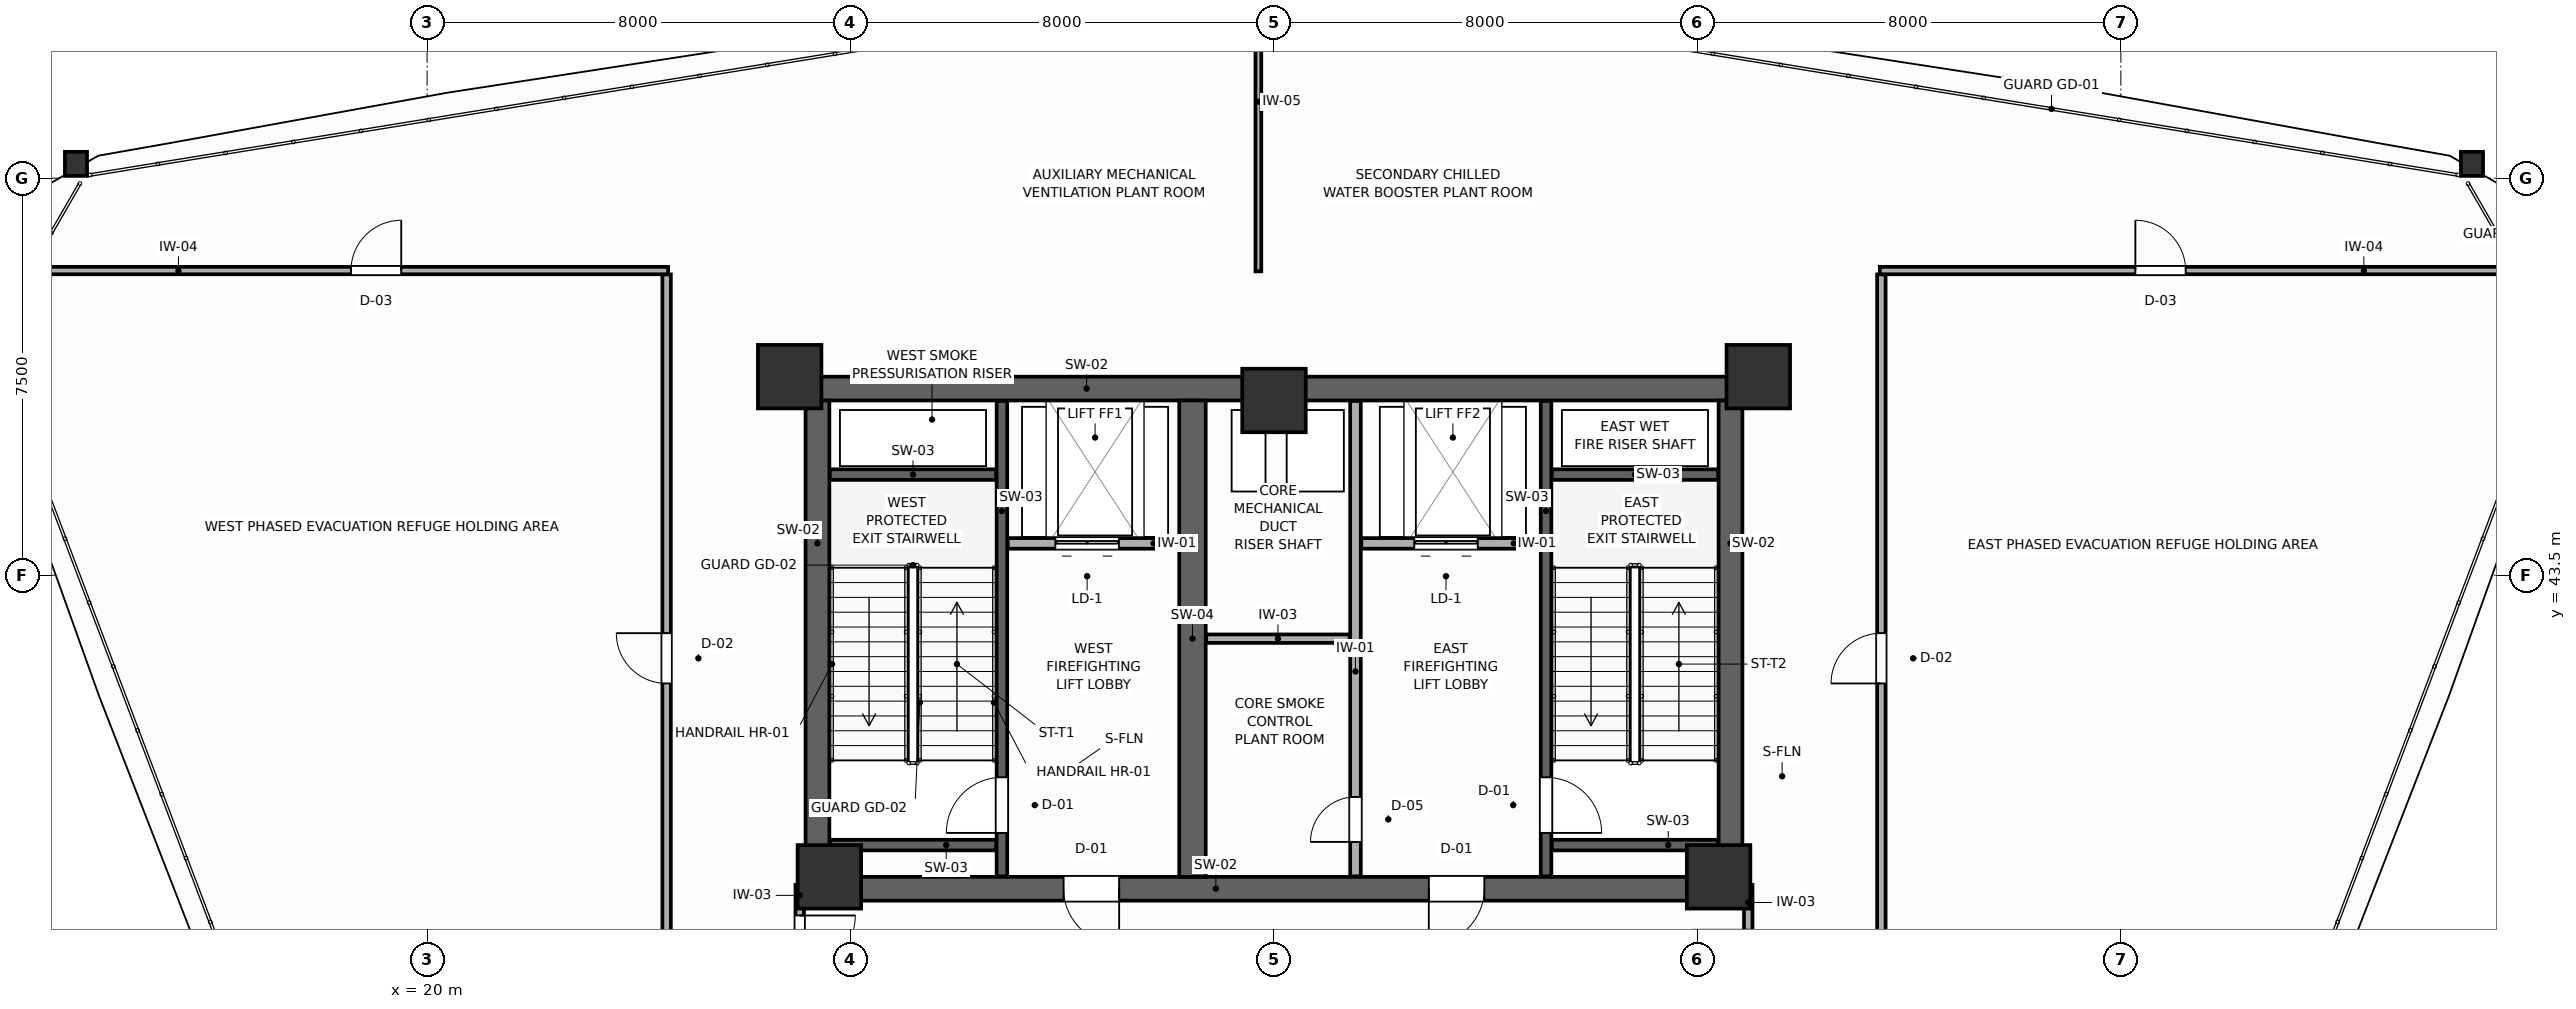
"""IFC4 building model, lengths in metres.
Left out: names, types, materials, properties, quantities, classifications, styles, units other than length and angle.
Written with IfcOpenShell. Run it as: python <this file> out.ifc"""

import sys

from ifc_helpers import new_model, si_unit, direction, frame, frame_2d, origin, origin_2d, place, context, subcontext, project, spatial, rectangle, i_section, extrude, source, transform, mapped, element, fill, save


model = new_model("IFC4")
c1 = context("Model", 3, precision=1e-05, world=origin(), true_north=direction((0.0, 1.0)))
c2 = subcontext(c1, "Body", "Model", "MODEL_VIEW")
j1 = project(units=[si_unit("LENGTHUNIT", "METRE"), si_unit("PLANEANGLEUNIT", "RADIAN")], contexts=[c1])
p1 = place(None, origin())
s1 = spatial("IfcSite", under=j1, at=p1, CompositionType="ELEMENT")
p2 = place(p1, origin())
s2 = spatial("IfcBuilding", under=s1, at=p2, CompositionType="ELEMENT")
p3 = place(p2, frame((0.0, 0.0, 131.4)))
s3 = spatial("IfcBuildingStorey", under=s2, at=p3, CompositionType="ELEMENT", Elevation=131.4)
p4 = place(p3, frame((27.15, 47.025, 0.0), z_axis=(0.0, 0.0, 1.0), x_axis=(1.0, 0.0, 0.0)))
e1 = element("IfcWall", 1, at=p4, inside=s3, PredefinedType="SHEAR", context=c2, shape_type="SweptSolid", body=[
    extrude(rectangle(XDim=17.7, YDim=0.45, at=frame_2d((8.85, 0.0))), origin(), (0.0, 0.0, 1.0), 4.8),
])
p5 = place(p3, frame((27.15, 37.575, 0.0), z_axis=(0.0, 0.0, 1.0), x_axis=(1.0, 0.0, 0.0)))
e2 = element("IfcWall", 2, at=p5, inside=s3, PredefinedType="SHEAR", context=c2, shape_type="SweptSolid", body=[
    extrude(rectangle(XDim=17.7, YDim=0.45, at=frame_2d((8.85, 0.0))), origin(), (0.0, 0.0, 1.0), 4.8),
])
p6 = place(p5, frame((4.875, 0.0, 0.0)))
e3 = element("IfcOpeningElement", 3, at=p6, cuts=e2, PredefinedType="OPENING", context=c2, shape_type="SweptSolid", body=[
    extrude(rectangle(XDim=1.05, YDim=2.1, at=frame_2d((0.525, 1.05))), frame((0.0, 0.235, 0.0), z_axis=(0.0, -1.0, 0.0), x_axis=(1.0, 0.0, 0.0)), (0.0, 0.0, 1.0), 0.47),
])
p7 = place(p5, frame((11.775, 0.0, 0.0)))
e4 = element("IfcOpeningElement", 4, at=p7, cuts=e2, PredefinedType="OPENING", context=c2, shape_type="SweptSolid", body=[
    extrude(rectangle(XDim=1.05, YDim=2.1, at=frame_2d((0.525, 1.05))), frame((0.0, 0.235, 0.0), z_axis=(0.0, -1.0, 0.0), x_axis=(1.0, 0.0, 0.0)), (0.0, 0.0, 1.0), 0.47),
])
for number, where, z_axis, x_axis in (
    (5, (27.375, 37.8, 0.0), (0.0, 0.0, 1.0), (0.0, 1.0, 0.0)),
    (6, (44.625, 37.8, 0.0), (0.0, 0.0, 1.0), (0.0, 1.0, 0.0)),
):
    element("IfcWall", number, at=place(p3, frame(where, z_axis=z_axis, x_axis=x_axis)), inside=s3, PredefinedType="SHEAR", context=c2, shape_type="SweptSolid", body=[
        extrude(rectangle(XDim=9.0, YDim=0.45, at=frame_2d((4.5, 0.0))), origin(), (0.0, 0.0, 1.0), 4.8),
    ])
p8 = place(p3, frame((34.46, 37.8, 0.0), z_axis=(0.0, 0.0, 1.0), x_axis=(0.0, 1.0, 0.0)))
e7 = element("IfcWall", 7, at=p8, inside=s3, PredefinedType="SHEAR", context=c2, shape_type="SweptSolid", body=[
    extrude(rectangle(XDim=9.0, YDim=0.5, at=frame_2d((4.5, 0.0))), origin(), (0.0, 0.0, 1.0), 4.6),
])
m1 = source(origin(), c2, "Body", "SweptSolid", [
    extrude(rectangle(XDim=1.2, YDim=1.2, at=origin_2d()), origin(), (0.0, 0.0, 1.0), 4.8),
])
for number, where, z_axis, x_axis in (
    (8, (26.85, 47.25, 0.0), (0.0, 0.0, 1.0), (1.0, 0.0, 0.0)),
    (9, (45.15, 47.25, 0.0), (0.0, 0.0, 1.0), (1.0, 0.0, 0.0)),
    (10, (27.6, 37.8, 0.0), (0.0, 0.0, 1.0), (1.0, 0.0, 0.0)),
    (11, (44.4, 37.8, 0.0), (0.0, 0.0, 1.0), (1.0, 0.0, 0.0)),
    (12, (36.0, 46.8, 0.0), (0.0, 0.0, 1.0), (1.0, 0.0, 0.0)),
):
    element("IfcColumn", number, at=place(p3, frame(where, z_axis=z_axis, x_axis=x_axis)), inside=s3, PredefinedType="COLUMN", context=c2, shape_type="MappedRepresentation", body=[
        mapped(m1, transform((0.0, 0.0, 0.0), scale=1.0)),
    ])
m2 = source(origin(), c2, "Body", "SweptSolid", [
    extrude(i_section(OverallWidth=0.418, OverallDepth=0.455, WebThickness=0.039, FlangeThickness=0.063, FilletRadius=0.015, at=origin_2d()), origin(), (0.0, 0.0, 1.0), 4.8),
])
for number, where, z_axis, x_axis in (
    (13, (58.634, 51.271, 0.0), (0.0, 0.0, 1.0), (1.0, 0.0, 0.0)),
    (14, (13.366, 51.271, 0.0), (0.0, 0.0, 1.0), (1.0, 0.0, 0.0)),
):
    element("IfcColumn", number, at=place(p3, frame(where, z_axis=z_axis, x_axis=x_axis)), inside=s3, PredefinedType="COLUMN", context=c2, shape_type="MappedRepresentation", body=[
        mapped(m2, transform((0.0, 0.0, 0.0), scale=1.0)),
    ])
p9 = place(p3, frame((30.86, 37.81, 0.0), z_axis=(0.0, 0.0, 1.0), x_axis=(0.0, 1.0, 0.0)))
e15 = element("IfcWall", 15, at=p9, inside=s3, PredefinedType="SHEAR", context=c2, shape_type="SweptSolid", body=[
    extrude(rectangle(XDim=8.98, YDim=0.2, at=frame_2d((4.49, 0.0))), origin(), (0.0, 0.0, 1.0), 4.8),
])
p10 = place(p9, frame((0.82, 0.0, 0.0)))
e16 = element("IfcOpeningElement", 16, at=p10, cuts=e15, PredefinedType="OPENING", context=c2, shape_type="SweptSolid", body=[
    extrude(rectangle(XDim=1.05, YDim=2.1, at=frame_2d((0.525, 1.05))), frame((0.0, 0.11, 0.0), z_axis=(0.0, -1.0, 0.0), x_axis=(1.0, 0.0, 0.0)), (0.0, 0.0, 1.0), 0.22),
])
for number, where, z_axis, x_axis in (
    (17, (27.61, 45.4, 0.0), (0.0, 0.0, 1.0), (1.0, 0.0, 0.0)),
    (18, (27.61, 38.4, 0.0), (0.0, 0.0, 1.0), (1.0, 0.0, 0.0)),
):
    element("IfcWall", number, at=place(p3, frame(where, z_axis=z_axis, x_axis=x_axis)), inside=s3, PredefinedType="SHEAR", context=c2, shape_type="SweptSolid", body=[
        extrude(rectangle(XDim=3.14, YDim=0.2, at=frame_2d((1.57, 0.0))), origin(), (0.0, 0.0, 1.0), 4.8),
    ])
p11 = place(p3, frame((41.14, 37.81, 0.0), z_axis=(0.0, 0.0, 1.0), x_axis=(0.0, 1.0, 0.0)))
e19 = element("IfcWall", 19, at=p11, inside=s3, PredefinedType="SHEAR", context=c2, shape_type="SweptSolid", body=[
    extrude(rectangle(XDim=8.98, YDim=0.2, at=frame_2d((4.49, 0.0))), origin(), (0.0, 0.0, 1.0), 4.8),
])
p12 = place(p11, frame((0.82, 0.0, 0.0)))
e20 = element("IfcOpeningElement", 20, at=p12, cuts=e19, PredefinedType="OPENING", context=c2, shape_type="SweptSolid", body=[
    extrude(rectangle(XDim=1.05, YDim=2.1, at=frame_2d((0.525, 1.05))), frame((0.0, 0.11, 0.0), z_axis=(0.0, -1.0, 0.0), x_axis=(1.0, 0.0, 0.0)), (0.0, 0.0, 1.0), 0.22),
])
for number, where, z_axis, x_axis in (
    (21, (41.25, 45.4, 0.0), (0.0, 0.0, 1.0), (1.0, 0.0, 0.0)),
    (22, (41.25, 38.4, 0.0), (0.0, 0.0, 1.0), (1.0, 0.0, 0.0)),
):
    element("IfcWall", number, at=place(p3, frame(where, z_axis=z_axis, x_axis=x_axis)), inside=s3, PredefinedType="SHEAR", context=c2, shape_type="SweptSolid", body=[
        extrude(rectangle(XDim=3.14, YDim=0.2, at=frame_2d((1.57, 0.0))), origin(), (0.0, 0.0, 1.0), 4.8),
    ])
p13 = place(p3, frame((30.97, 44.1, 0.0), z_axis=(0.0, 0.0, 1.0), x_axis=(1.0, 0.0, 0.0)))
e23 = element("IfcWall", 23, at=p13, inside=s3, PredefinedType="PARTITIONING", context=c2, shape_type="SweptSolid", body=[
    extrude(rectangle(XDim=3.23, YDim=0.2, at=frame_2d((1.615, 0.0))), origin(), (0.0, 0.0, 1.0), 4.6),
])
p14 = place(p13, frame((0.9, 0.0, 0.0)))
e24 = element("IfcOpeningElement", 24, at=p14, cuts=e23, PredefinedType="OPENING", context=c2, shape_type="SweptSolid", body=[
    extrude(rectangle(XDim=1.2, YDim=2.1, at=frame_2d((0.6, 1.05))), frame((0.0, 0.11, 0.0), z_axis=(0.0, -1.0, 0.0), x_axis=(1.0, 0.0, 0.0)), (0.0, 0.0, 1.0), 0.22),
])
p15 = place(p3, frame((37.65, 44.1, 0.0), z_axis=(0.0, 0.0, 1.0), x_axis=(1.0, 0.0, 0.0)))
e25 = element("IfcWall", 25, at=p15, inside=s3, PredefinedType="PARTITIONING", context=c2, shape_type="SweptSolid", body=[
    extrude(rectangle(XDim=3.38, YDim=0.2, at=frame_2d((1.69, 0.0))), origin(), (0.0, 0.0, 1.0), 4.6),
])
p16 = place(p15, frame((1.0, 0.0, 0.0)))
e26 = element("IfcOpeningElement", 26, at=p16, cuts=e25, PredefinedType="OPENING", context=c2, shape_type="SweptSolid", body=[
    extrude(rectangle(XDim=1.2, YDim=2.1, at=frame_2d((0.6, 1.05))), frame((0.0, 0.11, 0.0), z_axis=(0.0, -1.0, 0.0), x_axis=(1.0, 0.0, 0.0)), (0.0, 0.0, 1.0), 0.22),
])
p17 = place(p3, frame((37.54, 37.81, 0.0), z_axis=(0.0, 0.0, 1.0), x_axis=(0.0, 1.0, 0.0)))
e27 = element("IfcWall", 27, at=p17, inside=s3, PredefinedType="PARTITIONING", context=c2, shape_type="SweptSolid", body=[
    extrude(rectangle(XDim=8.98, YDim=0.2, at=frame_2d((4.49, 0.0))), origin(), (0.0, 0.0, 1.0), 4.6),
])
p18 = place(p17, frame((0.65, 0.0, 0.0)))
e28 = element("IfcOpeningElement", 28, at=p18, cuts=e27, PredefinedType="OPENING", context=c2, shape_type="SweptSolid", body=[
    extrude(rectangle(XDim=0.85, YDim=2.05, at=frame_2d((0.425, 1.025))), frame((0.0, 0.11, 0.0), z_axis=(0.0, -1.0, 0.0), x_axis=(1.0, 0.0, 0.0)), (0.0, 0.0, 1.0), 0.22),
])
p19 = place(p3, frame((34.72, 42.3, 0.0), z_axis=(0.0, 0.0, 1.0), x_axis=(1.0, 0.0, 0.0)))
e29 = element("IfcWall", 29, at=p19, inside=s3, PredefinedType="PARTITIONING", context=c2, shape_type="SweptSolid", body=[
    extrude(rectangle(XDim=2.71, YDim=0.16, at=frame_2d((1.355, 0.0))), origin(), (0.0, 0.0, 1.0), 4.6),
])
p20 = place(p3, frame((27.04, 35.54, 0.0), z_axis=(0.0, 0.0, 1.0), x_axis=(0.0, 1.0, 0.0)))
e30 = element("IfcWall", 30, at=p20, inside=s3, PredefinedType="PARTITIONING", context=c2, shape_type="SweptSolid", body=[
    extrude(rectangle(XDim=2.11, YDim=0.16, at=frame_2d((1.055, 0.0))), origin(), (0.0, 0.0, 1.0), 4.6),
])
p21 = place(p20, frame((0.48, 0.0, 0.0)))
e31 = element("IfcOpeningElement", 31, at=p21, cuts=e30, PredefinedType="OPENING", context=c2, shape_type="SweptSolid", body=[
    extrude(rectangle(XDim=1.05, YDim=2.1, at=frame_2d((0.525, 1.05))), frame((0.0, 0.09, 0.0), z_axis=(0.0, -1.0, 0.0), x_axis=(1.0, 0.0, 0.0)), (0.0, 0.0, 1.0), 0.18),
])
p22 = place(p3, frame((44.96, 35.0, 0.0), z_axis=(0.0, 0.0, 1.0), x_axis=(0.0, 1.0, 0.0)))
e32 = element("IfcWall", 32, at=p22, inside=s3, PredefinedType="PARTITIONING", context=c2, shape_type="SweptSolid", body=[
    extrude(rectangle(XDim=2.65, YDim=0.16, at=frame_2d((1.325, 0.0))), origin(), (0.0, 0.0, 1.0), 4.6),
])
p23 = place(p22, frame((0.75, 0.0, 0.0)))
e33 = element("IfcOpeningElement", 33, at=p23, cuts=e32, PredefinedType="OPENING", context=c2, shape_type="SweptSolid", body=[
    extrude(rectangle(XDim=1.05, YDim=2.1, at=frame_2d((0.525, 1.05))), frame((0.0, 0.09, 0.0), z_axis=(0.0, -1.0, 0.0), x_axis=(1.0, 0.0, 0.0)), (0.0, 0.0, 1.0), 0.18),
])
p24 = place(p3, frame((47.475, 30.72, 0.0), z_axis=(0.0, 0.0, 1.0), x_axis=(0.0, 1.0, 0.0)))
e34 = element("IfcWall", 34, at=p24, inside=s3, PredefinedType="PARTITIONING", context=c2, shape_type="SweptSolid", body=[
    extrude(rectangle(XDim=18.463, YDim=0.16, at=frame_2d((9.231, 0.0))), origin(), (0.0, 0.0, 1.0), 4.6),
])
p25 = place(p24, frame((10.734, 0.0, 0.0)))
e35 = element("IfcOpeningElement", 35, at=p25, cuts=e34, PredefinedType="OPENING", context=c2, shape_type="SweptSolid", body=[
    extrude(rectangle(XDim=0.95, YDim=2.05, at=frame_2d((0.475, 1.025))), frame((0.0, 0.09, 0.0), z_axis=(0.0, -1.0, 0.0), x_axis=(1.0, 0.0, 0.0)), (0.0, 0.0, 1.0), 0.18),
])
p26 = place(p3, frame((24.525, 30.72, 0.0), z_axis=(0.0, 0.0, 1.0), x_axis=(0.0, 1.0, 0.0)))
e36 = element("IfcWall", 36, at=p26, inside=s3, PredefinedType="PARTITIONING", context=c2, shape_type="SweptSolid", body=[
    extrude(rectangle(XDim=18.463, YDim=0.16, at=frame_2d((9.231, 0.0))), origin(), (0.0, 0.0, 1.0), 4.6),
])
p27 = place(p26, frame((10.734, 0.0, 0.0)))
e37 = element("IfcOpeningElement", 37, at=p27, cuts=e36, PredefinedType="OPENING", context=c2, shape_type="SweptSolid", body=[
    extrude(rectangle(XDim=0.95, YDim=2.05, at=frame_2d((0.475, 1.025))), frame((0.0, 0.09, 0.0), z_axis=(0.0, -1.0, 0.0), x_axis=(1.0, 0.0, 0.0)), (0.0, 0.0, 1.0), 0.18),
])
p28 = place(p3, frame((47.447, 49.255, 0.0), z_axis=(0.0, 0.0, 1.0), x_axis=(1.0, 0.0, 0.0)))
e38 = element("IfcWall", 38, at=p28, inside=s3, PredefinedType="PARTITIONING", context=c2, shape_type="SweptSolid", body=[
    extrude(rectangle(XDim=12.331, YDim=0.14, at=frame_2d((6.166, 0.0))), origin(), (0.0, 0.0, 1.0), 4.6),
])
p29 = place(p28, frame((4.827, 0.0, 0.0)))
e39 = element("IfcOpeningElement", 39, at=p29, cuts=e38, PredefinedType="OPENING", context=c2, shape_type="SweptSolid", body=[
    extrude(rectangle(XDim=0.95, YDim=2.05, at=frame_2d((0.475, 1.025))), frame((0.0, 0.08, 0.0), z_axis=(0.0, -1.0, 0.0), x_axis=(1.0, 0.0, 0.0)), (0.0, 0.0, 1.0), 0.16),
])
p30 = place(p3, frame((12.222, 49.255, 0.0), z_axis=(0.0, 0.0, 1.0), x_axis=(1.0, 0.0, 0.0)))
e40 = element("IfcWall", 40, at=p30, inside=s3, PredefinedType="PARTITIONING", context=c2, shape_type="SweptSolid", body=[
    extrude(rectangle(XDim=12.331, YDim=0.14, at=frame_2d((6.166, 0.0))), origin(), (0.0, 0.0, 1.0), 2.97),
])
p31 = place(p30, frame((6.339, 0.0, 0.0)))
e41 = element("IfcOpeningElement", 41, at=p31, cuts=e40, PredefinedType="OPENING", context=c2, shape_type="SweptSolid", body=[
    extrude(rectangle(XDim=0.95, YDim=2.05, at=frame_2d((0.475, 1.025))), frame((0.0, 0.08, 0.0), z_axis=(0.0, -1.0, 0.0), x_axis=(1.0, 0.0, 0.0)), (0.0, 0.0, 1.0), 0.16),
])
p32 = place(p3, frame((35.705, 49.24, 0.0), z_axis=(0.0, 0.0, 1.0), x_axis=(0.0, 1.0, 0.0)))
e42 = element("IfcWall", 42, at=p32, inside=s3, PredefinedType="MOVABLE", context=c2, shape_type="SweptSolid", body=[
    extrude(rectangle(XDim=4.581, YDim=0.11, at=frame_2d((2.291, 0.0))), origin(), (0.0, 0.0, 1.0), 4.6),
])
p33 = place(p10, origin())
e43 = element("IfcDoor", 43, at=p33, inside=s3, OperationType="SINGLE_SWING_LEFT", PredefinedType="DOOR", context=c2, shape_type="SweptSolid", body=[
    extrude(rectangle(XDim=1.05, YDim=2.1, at=frame_2d((0.525, 1.05))), frame((0.0, 0.025, 0.0), z_axis=(0.0, -1.0, 0.0), x_axis=(1.0, 0.0, 0.0)), (0.0, 0.0, 1.0), 0.05),
])
fill(e16, e43)
p34 = place(p12, frame((1.05, 0.0, 0.0), z_axis=(0.0, 0.0, 1.0), x_axis=(-1.0, 0.0, 0.0)))
e44 = element("IfcDoor", 44, at=p34, inside=s3, OperationType="SINGLE_SWING_RIGHT", PredefinedType="DOOR", context=c2, shape_type="SweptSolid", body=[
    extrude(rectangle(XDim=1.05, YDim=2.1, at=frame_2d((0.525, 1.05))), frame((0.0, 0.025, 0.0), z_axis=(0.0, -1.0, 0.0), x_axis=(1.0, 0.0, 0.0)), (0.0, 0.0, 1.0), 0.05),
])
fill(e20, e44)
p35 = place(p14, origin())
e45 = element("IfcDoor", 45, at=p35, inside=s3, OperationType="DOUBLE_DOOR_SLIDING", PredefinedType="DOOR", context=c2, shape_type="SweptSolid", body=[
    extrude(rectangle(XDim=1.2, YDim=2.1, at=frame_2d((0.6, 1.05))), frame((0.0, 0.025, 0.0), z_axis=(0.0, -1.0, 0.0), x_axis=(1.0, 0.0, 0.0)), (0.0, 0.0, 1.0), 0.05),
])
fill(e24, e45)
p36 = place(p16, origin())
e46 = element("IfcDoor", 46, at=p36, inside=s3, OperationType="DOUBLE_DOOR_SLIDING", PredefinedType="DOOR", context=c2, shape_type="SweptSolid", body=[
    extrude(rectangle(XDim=1.2, YDim=2.1, at=frame_2d((0.6, 1.05))), frame((0.0, 0.025, 0.0), z_axis=(0.0, -1.0, 0.0), x_axis=(1.0, 0.0, 0.0)), (0.0, 0.0, 1.0), 0.05),
])
fill(e26, e46)
p37 = place(p18, origin())
e47 = element("IfcDoor", 47, at=p37, inside=s3, OperationType="SINGLE_SWING_LEFT", PredefinedType="DOOR", context=c2, shape_type="SweptSolid", body=[
    extrude(rectangle(XDim=0.85, YDim=2.05, at=frame_2d((0.425, 1.025))), frame((0.0, 0.025, 0.0), z_axis=(0.0, -1.0, 0.0), x_axis=(1.0, 0.0, 0.0)), (0.0, 0.0, 1.0), 0.05),
])
fill(e28, e47)
p38 = place(p21, frame((1.05, 0.0, 0.0), z_axis=(0.0, 0.0, 1.0), x_axis=(-1.0, 0.0, 0.0)))
e48 = element("IfcDoor", 48, at=p38, inside=s3, OperationType="SINGLE_SWING_LEFT", PredefinedType="DOOR", context=c2, shape_type="SweptSolid", body=[
    extrude(rectangle(XDim=1.05, YDim=2.1, at=frame_2d((0.525, 1.05))), frame((0.0, 0.025, 0.0), z_axis=(0.0, -1.0, 0.0), x_axis=(1.0, 0.0, 0.0)), (0.0, 0.0, 1.0), 0.05),
])
fill(e31, e48)
p39 = place(p25, origin())
e49 = element("IfcDoor", 49, at=p39, inside=s3, OperationType="SINGLE_SWING_LEFT", PredefinedType="DOOR", context=c2, shape_type="SweptSolid", body=[
    extrude(rectangle(XDim=0.95, YDim=2.05, at=frame_2d((0.475, 1.025))), frame((0.0, 0.025, 0.0), z_axis=(0.0, -1.0, 0.0), x_axis=(1.0, 0.0, 0.0)), (0.0, 0.0, 1.0), 0.05),
])
fill(e35, e49)
p40 = place(p27, origin())
e50 = element("IfcDoor", 50, at=p40, inside=s3, OperationType="SINGLE_SWING_RIGHT", PredefinedType="DOOR", context=c2, shape_type="SweptSolid", body=[
    extrude(rectangle(XDim=0.95, YDim=2.05, at=frame_2d((0.475, 1.025))), frame((0.0, 0.025, 0.0), z_axis=(0.0, -1.0, 0.0), x_axis=(1.0, 0.0, 0.0)), (0.0, 0.0, 1.0), 0.05),
])
fill(e37, e50)
p41 = place(p29, origin())
e51 = element("IfcDoor", 51, at=p41, inside=s3, OperationType="SINGLE_SWING_LEFT", PredefinedType="DOOR", context=c2, shape_type="SweptSolid", body=[
    extrude(rectangle(XDim=0.95, YDim=2.05, at=frame_2d((0.475, 1.025))), frame((0.0, 0.025, 0.0), z_axis=(0.0, -1.0, 0.0), x_axis=(1.0, 0.0, 0.0)), (0.0, 0.0, 1.0), 0.05),
])
fill(e39, e51)
p42 = place(p31, origin())
e52 = element("IfcDoor", 52, at=p42, inside=s3, OperationType="SINGLE_SWING_RIGHT", PredefinedType="DOOR", context=c2, shape_type="SweptSolid", body=[
    extrude(rectangle(XDim=0.95, YDim=2.05, at=frame_2d((0.475, 1.025))), frame((0.0, 0.025, 0.0), z_axis=(0.0, -1.0, 0.0), x_axis=(1.0, 0.0, 0.0)), (0.0, 0.0, 1.0), 0.05),
])
fill(e41, e52)
p43 = place(p6, frame((1.05, 0.0, 0.0), z_axis=(0.0, 0.0, 1.0), x_axis=(-1.0, 0.0, 0.0)))
e53 = element("IfcDoor", 53, at=p43, inside=s3, OperationType="SINGLE_SWING_LEFT", PredefinedType="DOOR", context=c2, shape_type="SweptSolid", body=[
    extrude(rectangle(XDim=1.05, YDim=2.1, at=frame_2d((0.525, 1.05))), frame((0.0, 0.025, 0.0), z_axis=(0.0, -1.0, 0.0), x_axis=(1.0, 0.0, 0.0)), (0.0, 0.0, 1.0), 0.05),
])
fill(e3, e53)
p44 = place(p7, frame((1.05, 0.0, 0.0), z_axis=(0.0, 0.0, 1.0), x_axis=(-1.0, 0.0, 0.0)))
e54 = element("IfcDoor", 54, at=p44, inside=s3, OperationType="SINGLE_SWING_RIGHT", PredefinedType="DOOR", context=c2, shape_type="SweptSolid", body=[
    extrude(rectangle(XDim=1.05, YDim=2.1, at=frame_2d((0.525, 1.05))), frame((0.0, 0.025, 0.0), z_axis=(0.0, -1.0, 0.0), x_axis=(1.0, 0.0, 0.0)), (0.0, 0.0, 1.0), 0.05),
])
fill(e4, e54)
save(model, sys.argv[1])
